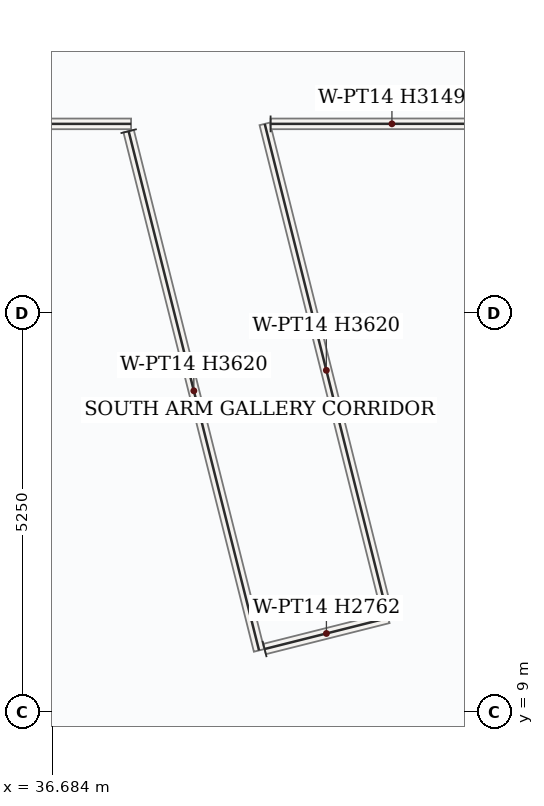
"""IFC4 building model, lengths in metres.
Left out: names, types, materials, properties, quantities, classifications, styles, units other than length and angle.
Written with IfcOpenShell. Run it as: python <this file> out.ifc"""

import sys

from ifc_helpers import new_model, si_unit, direction, frame, frame_2d, origin, place, context, subcontext, project, spatial, rectangle, extrude, source, transform, mapped, element, save


model = new_model("IFC4")
c1 = context("Model", 3, precision=1e-05, world=origin(), true_north=direction((0.0, 1.0)))
c2 = subcontext(c1, "Body", "Model", "MODEL_VIEW")
j1 = project(units=[si_unit("LENGTHUNIT", "METRE"), si_unit("PLANEANGLEUNIT", "RADIAN")], contexts=[c1])
p1 = place(None, origin())
s1 = spatial("IfcSite", under=j1, at=p1, CompositionType="ELEMENT")
p2 = place(p1, origin())
s2 = spatial("IfcBuilding", under=s1, at=p2, CompositionType="ELEMENT")
p3 = place(p2, frame((0.0, 0.0, 190.2)))
s3 = spatial("IfcBuildingStorey", under=s2, at=p3, CompositionType="ELEMENT", Elevation=190.2)
p4 = place(p3, frame((29.912, 16.74, 0.0), z_axis=(0.0, 0.0, 1.0), x_axis=(1.0, 0.0, 0.0)))
e1 = element("IfcWall", 1, at=p4, inside=s3, PredefinedType="PARTITIONING", context=c2, shape_type="SweptSolid", body=[
    extrude(rectangle(XDim=7.806, YDim=0.14, at=frame_2d((3.903, 0.0))), origin(), (0.0, 0.0, 1.0), 3.62),
])
p5 = place(p4, frame((5.348, 0.0, 0.0)))
e2 = element("IfcOpeningElement", 2, at=p5, cuts=e1, PredefinedType="OPENING", context=c2, shape_type="SweptSolid", body=[
    extrude(rectangle(XDim=0.95, YDim=2.15, at=frame_2d((0.475, 1.075))), frame((0.0, 0.08, 0.0), z_axis=(0.0, -1.0, 0.0), x_axis=(1.0, 0.0, 0.0)), (0.0, 0.0, 1.0), 0.16),
])
m1 = source(origin(), c2, "Body", "SweptSolid", [
    extrude(rectangle(XDim=7.043, YDim=0.14, at=frame_2d((3.521, 0.0))), origin(), (0.0, 0.0, 1.0), 3.62),
])
p6 = place(p3, frame((37.687, 16.644, 0.0), z_axis=(0.0, 0.0, 1.0), x_axis=(0.243587652837, -0.969878886968, 0.0)))
e3 = element("IfcWall", 3, at=p6, inside=s3, PredefinedType="PARTITIONING", context=c2, shape_type="MappedRepresentation", body=[
    mapped(m1, transform((0.0, 0.0, 0.0), x_axis=(1.0, 0.0, 0.0), y_axis=(0.0, 1.0, 0.0), z_axis=(0.0, 0.0, 1.0), scale=1.0)),
])
m2 = source(origin(), c2, "Body", "SweptSolid", [
    extrude(rectangle(XDim=1.678, YDim=0.14, at=frame_2d((0.839, 0.0))), origin(), (0.0, 0.0, 1.0), 2.762),
])
p7 = place(p3, frame((39.475, 9.831, 0.0), z_axis=(0.0, 0.0, 1.0), x_axis=(0.969799114262, 0.243905059349, 0.0)))
e4 = element("IfcWall", 4, at=p7, inside=s3, PredefinedType="PARTITIONING", context=c2, shape_type="MappedRepresentation", body=[
    mapped(m2, transform((0.0, 0.0, 0.0), x_axis=(1.0, 0.0, 0.0), y_axis=(0.0, 1.0, 0.0), z_axis=(0.0, 0.0, 1.0), scale=1.0)),
])
m3 = source(origin(), c2, "Body", "SweptSolid", [
    extrude(rectangle(XDim=6.684, YDim=0.14, at=frame_2d((3.342, 0.0))), origin(), (0.0, 0.0, 1.0), 3.62),
])
p8 = place(p3, frame((41.098, 10.256, 0.0), z_axis=(0.0, 0.0, 1.0), x_axis=(-0.24254421979, 0.970140351416, 0.0)))
e5 = element("IfcWall", 5, at=p8, inside=s3, PredefinedType="PARTITIONING", context=c2, shape_type="MappedRepresentation", body=[
    mapped(m3, transform((0.0, 0.0, 0.0), x_axis=(1.0, 0.0, 0.0), y_axis=(0.0, 1.0, 0.0), z_axis=(0.0, 0.0, 1.0), scale=1.0)),
])
m4 = source(origin(), c2, "Body", "SweptSolid", [
    extrude(rectangle(XDim=3.192, YDim=0.14, at=frame_2d((1.596, 0.0))), origin(), (0.0, 0.0, 1.0), 3.149),
])
p9 = place(p3, frame((39.554, 16.74, 0.0), z_axis=(0.0, 0.0, 1.0), x_axis=(0.999999926893, 0.000382379905, 0.0)))
e6 = element("IfcWall", 6, at=p9, inside=s3, PredefinedType="PARTITIONING", context=c2, shape_type="MappedRepresentation", body=[
    mapped(m4, transform((0.0, 0.0, 0.0), x_axis=(1.0, 0.0, 0.0), y_axis=(0.0, 1.0, 0.0), z_axis=(0.0, 0.0, 1.0), scale=1.0)),
])
save(model, sys.argv[1])
